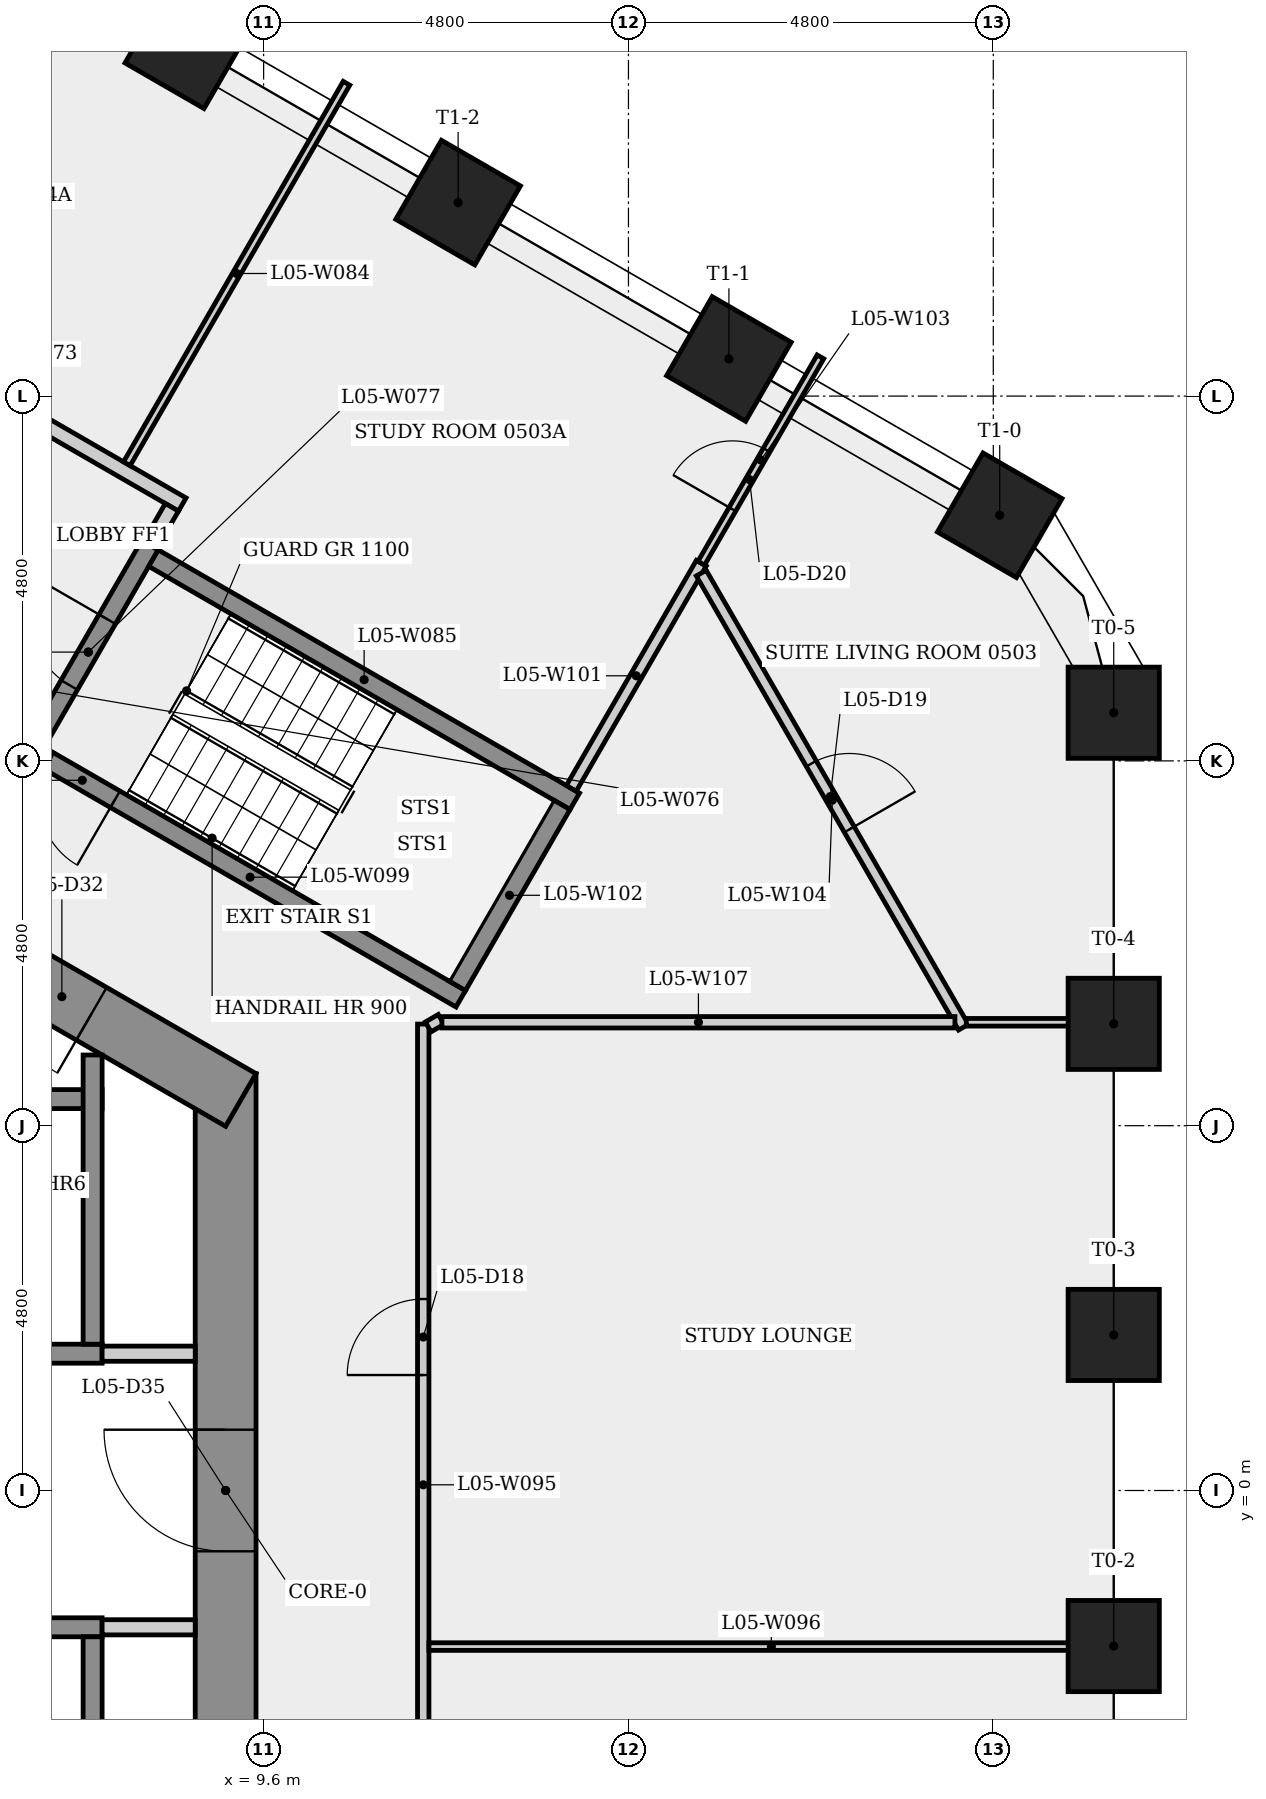
"""IFC4 building model, lengths in metres.
Left out: names, types, materials, properties, quantities, classifications, styles, units other than length and angle.
Written with IfcOpenShell. Run it as: python <this file> out.ifc"""

import sys

from ifc_helpers import new_model, si_unit, direction, frame, frame_2d, origin, origin_2d, place, context, subcontext, project, spatial, rectangle, extrude, element, fill, save


model = new_model("IFC4")
c1 = context("Model", 3, precision=1e-05, world=origin(), true_north=direction((0.0, 1.0)))
c2 = subcontext(c1, "Body", "Model", "MODEL_VIEW")
j1 = project(units=[si_unit("LENGTHUNIT", "METRE"), si_unit("PLANEANGLEUNIT", "RADIAN")], contexts=[c1])
p1 = place(None, origin())
s1 = spatial("IfcSite", under=j1, at=p1, CompositionType="ELEMENT")
p2 = place(p1, origin())
s2 = spatial("IfcBuilding", under=s1, at=p2, CompositionType="ELEMENT")
p3 = place(p2, frame((0.0, 0.0, 25.5)))
s3 = spatial("IfcBuildingStorey", under=s2, at=p3, CompositionType="ELEMENT", Elevation=25.5)
p4 = place(p3, frame((9.1, -5.485, 0.0), z_axis=(0.0, 0.0, 1.0), x_axis=(0.0, 1.0, 0.0)))
e1 = element("IfcWall", 1, at=p4, inside=s3, PredefinedType="SHEAR", context=c2, shape_type="SweptSolid", body=[
    extrude(rectangle(XDim=10.97, YDim=0.8, at=frame_2d((5.485, 0.0))), origin(), (0.0, 0.0, 1.0), 3.4),
])
p5 = place(p4, frame((4.685, 0.0, 0.0)))
e2 = element("IfcOpeningElement", 2, at=p5, cuts=e1, PredefinedType="OPENING", context=c2, shape_type="SweptSolid", body=[
    extrude(rectangle(XDim=1.6, YDim=2.1, at=frame_2d((0.8, 1.05))), frame((0.0, 0.41, 0.0), z_axis=(0.0, -1.0, 0.0), x_axis=(1.0, 0.0, 0.0)), (0.0, 0.0, 1.0), 0.82),
])
p6 = place(p3, frame((9.3, 5.138, 0.0), z_axis=(0.0, 0.0, 1.0), x_axis=(-0.866023993627, 0.500002442456, 0.0)))
e3 = element("IfcWall", 3, at=p6, inside=s3, PredefinedType="SHEAR", context=c2, shape_type="SweptSolid", body=[
    extrude(rectangle(XDim=10.97, YDim=0.8, at=frame_2d((5.485, 0.0))), origin(), (0.0, 0.0, 1.0), 3.4),
])
p7 = place(p6, frame((8.903, 0.0, 0.0)))
e4 = element("IfcOpeningElement", 4, at=p7, cuts=e3, PredefinedType="OPENING", context=c2, shape_type="SweptSolid", body=[
    extrude(rectangle(XDim=0.9, YDim=2.1, at=frame_2d((0.45, 1.05))), frame((0.0, 0.41, 0.0), z_axis=(0.0, -1.0, 0.0), x_axis=(1.0, 0.0, 0.0)), (0.0, 0.0, 1.0), 0.82),
])
p8 = place(p6, frame((2.269, 0.0, 0.0)))
e5 = element("IfcOpeningElement", 5, at=p8, cuts=e3, PredefinedType="OPENING", context=c2, shape_type="SweptSolid", body=[
    extrude(rectangle(XDim=0.9, YDim=2.1, at=frame_2d((0.45, 1.05))), frame((0.0, 0.41, 0.0), z_axis=(0.0, -1.0, 0.0), x_axis=(1.0, 0.0, 0.0)), (0.0, 0.0, 1.0), 0.82),
])
for number, where, z_axis, x_axis in (
    (6, (20.785, -2.047, 0.0), (0.0, 0.0, 1.0), (1.0, 0.0, 0.0)),
    (7, (20.785, 2.047, 0.0), (0.0, 0.0, 1.0), (1.0, 0.0, 0.0)),
    (8, (20.785, 6.14, 0.0), (0.0, 0.0, 1.0), (1.0, 0.0, 0.0)),
    (9, (20.785, 10.234, 0.0), (0.0, 0.0, 1.0), (1.0, 0.0, 0.0)),
    (10, (19.285, 12.832, 0.0), (0.0, 0.0, 1.0), (0.5, 0.866, 0.0)),
    (11, (15.722, 14.889, 0.0), (0.0, 0.0, 1.0), (0.5, 0.866, 0.0)),
    (12, (12.159, 16.946, 0.0), (0.0, 0.0, 1.0), (0.5, 0.866, 0.0)),
    (13, (8.596, 19.003, 0.0), (0.0, 0.0, 1.0), (0.5, 0.866, 0.0)),
):
    element("IfcColumn", number, at=place(p3, frame(where, z_axis=z_axis, x_axis=x_axis)), inside=s3, PredefinedType="COLUMN", context=c2, shape_type="SweptSolid", body=[
        extrude(rectangle(XDim=1.2, YDim=1.2, at=origin_2d()), origin(), (0.0, 0.0, 1.0), 3.4),
    ])
p9 = place(p3, frame((-7.475, 1.8, 0.0), z_axis=(0.0, 0.0, 1.0), x_axis=(1.0, 0.0, 0.0)))
e14 = element("IfcWall", 14, at=p9, inside=s3, PredefinedType="SHEAR", context=c2, shape_type="SweptSolid", body=[
    extrude(rectangle(XDim=14.95, YDim=0.25, at=frame_2d((7.475, 0.0))), origin(), (0.0, 0.0, 1.0), 3.05),
])
p10 = place(p3, frame((-7.225, 5.15, 0.0), z_axis=(0.0, 0.0, 1.0), x_axis=(1.0, 0.0, 0.0)))
e15 = element("IfcWall", 15, at=p10, inside=s3, PredefinedType="SHEAR", context=c2, shape_type="SweptSolid", body=[
    extrude(rectangle(XDim=14.7, YDim=0.25, at=frame_2d((7.35, 0.0))), origin(), (0.0, 0.0, 1.0), 3.05),
])
p11 = place(p3, frame((-7.225, -1.8, 0.0), z_axis=(0.0, 0.0, 1.0), x_axis=(1.0, 0.0, 0.0)))
e16 = element("IfcWall", 16, at=p11, inside=s3, PredefinedType="SHEAR", context=c2, shape_type="SweptSolid", body=[
    extrude(rectangle(XDim=14.7, YDim=0.25, at=frame_2d((7.35, 0.0))), origin(), (0.0, 0.0, 1.0), 3.05),
])
p12 = place(p11, frame((0.597, 0.0, 0.0)))
e17 = element("IfcOpeningElement", 17, at=p12, cuts=e16, PredefinedType="OPENING", context=c2, shape_type="SweptSolid", body=[
    extrude(rectangle(XDim=1.1, YDim=2.1, at=frame_2d((0.55, 1.05))), frame((0.0, 0.135, 0.0), z_axis=(0.0, -1.0, 0.0), x_axis=(1.0, 0.0, 0.0)), (0.0, 0.0, 1.0), 0.27),
])
p13 = place(p11, frame((3.0, 0.0, 0.0)))
e18 = element("IfcOpeningElement", 18, at=p13, cuts=e16, PredefinedType="OPENING", context=c2, shape_type="SweptSolid", body=[
    extrude(rectangle(XDim=1.1, YDim=2.1, at=frame_2d((0.55, 1.05))), frame((0.0, 0.135, 0.0), z_axis=(0.0, -1.0, 0.0), x_axis=(1.0, 0.0, 0.0)), (0.0, 0.0, 1.0), 0.27),
])
p14 = place(p11, frame((5.45, 0.0, 0.0)))
e19 = element("IfcOpeningElement", 19, at=p14, cuts=e16, PredefinedType="OPENING", context=c2, shape_type="SweptSolid", body=[
    extrude(rectangle(XDim=1.1, YDim=2.1, at=frame_2d((0.55, 1.05))), frame((0.0, 0.135, 0.0), z_axis=(0.0, -1.0, 0.0), x_axis=(1.0, 0.0, 0.0)), (0.0, 0.0, 1.0), 0.27),
])
p15 = place(p11, frame((7.9, 0.0, 0.0)))
e20 = element("IfcOpeningElement", 20, at=p15, cuts=e16, PredefinedType="OPENING", context=c2, shape_type="SweptSolid", body=[
    extrude(rectangle(XDim=1.1, YDim=2.1, at=frame_2d((0.55, 1.05))), frame((0.0, 0.135, 0.0), z_axis=(0.0, -1.0, 0.0), x_axis=(1.0, 0.0, 0.0)), (0.0, 0.0, 1.0), 0.27),
])
p16 = place(p11, frame((10.35, 0.0, 0.0)))
e21 = element("IfcOpeningElement", 21, at=p16, cuts=e16, PredefinedType="OPENING", context=c2, shape_type="SweptSolid", body=[
    extrude(rectangle(XDim=1.1, YDim=2.1, at=frame_2d((0.55, 1.05))), frame((0.0, 0.135, 0.0), z_axis=(0.0, -1.0, 0.0), x_axis=(1.0, 0.0, 0.0)), (0.0, 0.0, 1.0), 0.27),
])
p17 = place(p3, frame((4.459, 15.323, 0.0), z_axis=(0.0, 0.0, 1.0), x_axis=(0.866016039709, -0.500016218704, 0.0)))
e22 = element("IfcWall", 22, at=p17, inside=s3, PredefinedType="PARTITIONING", context=c2, shape_type="SweptSolid", body=[
    extrude(rectangle(XDim=4.7, YDim=0.2, at=frame_2d((2.35, 0.0))), origin(), (0.0, 0.0, 1.0), 3.05),
])
p18 = place(p3, frame((6.48, 9.624, 0.0), z_axis=(0.0, 0.0, 1.0), x_axis=(0.500017246033, 0.866015446554, 0.0)))
e23 = element("IfcWall", 23, at=p18, inside=s3, PredefinedType="SHEAR", context=c2, shape_type="SweptSolid", body=[
    extrude(rectangle(XDim=3.25, YDim=0.25, at=frame_2d((1.625, 0.0))), origin(), (0.0, 0.0, 1.0), 3.05),
])
p19 = place(p18, frame((1.125, 0.0, 0.0)))
e24 = element("IfcOpeningElement", 24, at=p19, cuts=e23, PredefinedType="OPENING", context=c2, shape_type="SweptSolid", body=[
    extrude(rectangle(XDim=1.0, YDim=2.1, at=frame_2d((0.5, 1.05))), frame((0.0, 0.135, 0.0), z_axis=(0.0, -1.0, 0.0), x_axis=(1.0, 0.0, 0.0)), (0.0, 0.0, 1.0), 0.27),
])
p20 = place(p3, frame((7.475, 1.8, 0.0), z_axis=(0.0, 0.0, 1.0), x_axis=(1.0, 0.0, 0.0)))
e25 = element("IfcWall", 25, at=p20, inside=s3, PredefinedType="PARTITIONING", context=c2, shape_type="SweptSolid", body=[
    extrude(rectangle(XDim=1.225, YDim=0.2, at=frame_2d((0.613, 0.0))), origin(), (0.0, 0.0, 1.0), 3.05),
])
for number, where, z_axis, x_axis in (
    (26, (7.35, -1.925, 0.0), (0.0, 0.0, 1.0), (0.0, -1.0, 0.0)),
    (27, (7.35, 5.73, 0.0), (0.0, 0.0, 1.0), (0.0, -1.0, 0.0)),
):
    element("IfcWall", number, at=place(p3, frame(where, z_axis=z_axis, x_axis=x_axis)), inside=s3, PredefinedType="SHEAR", context=c2, shape_type="SweptSolid", body=[
        extrude(rectangle(XDim=3.805, YDim=0.25, at=frame_2d((1.903, 0.0))), origin(), (0.0, 0.0, 1.0), 3.05),
    ])
p21 = place(p3, frame((7.8, 13.51, 0.0), z_axis=(0.0, 0.0, 1.0), x_axis=(0.499982030767, 0.866035778077, 0.0)))
e28 = element("IfcWall", 28, at=p21, inside=s3, PredefinedType="PARTITIONING", context=c2, shape_type="SweptSolid", body=[
    extrude(rectangle(XDim=5.781, YDim=0.1, at=frame_2d((2.89, 0.0))), origin(), (0.0, 0.0, 1.0), 3.05),
])
p22 = place(p3, frame((8.151, 12.268, 0.0), z_axis=(0.0, 0.0, 1.0), x_axis=(0.866025499775, -0.499999833739, 0.0)))
e29 = element("IfcWall", 29, at=p22, inside=s3, PredefinedType="SHEAR", context=c2, shape_type="SweptSolid", body=[
    extrude(rectangle(XDim=6.4, YDim=0.25, at=frame_2d((3.2, 0.0))), origin(), (0.0, 0.0, 1.0), 3.05),
])
p23 = place(p3, frame((8.393, 12.937, 0.0), z_axis=(0.0, 0.0, 1.0), x_axis=(-0.500065409566, -0.86598763626, 0.0)))
e30 = element("IfcWall", 30, at=p23, inside=s3, PredefinedType="PARTITIONING", context=c2, shape_type="SweptSolid", body=[
    extrude(rectangle(XDim=0.575, YDim=0.2, at=frame_2d((0.288, 0.0))), origin(), (0.0, 0.0, 1.0), 3.05),
])
p24 = place(p3, frame((8.7, -1.8, 0.0), z_axis=(0.0, 0.0, 1.0), x_axis=(-1.0, 0.0, 0.0)))
e31 = element("IfcWall", 31, at=p24, inside=s3, PredefinedType="PARTITIONING", context=c2, shape_type="SweptSolid", body=[
    extrude(rectangle(XDim=1.225, YDim=0.2, at=frame_2d((0.613, 0.0))), origin(), (0.0, 0.0, 1.0), 3.05),
])
p25 = place(p3, frame((11.7, -5.987, 0.0), z_axis=(0.0, 0.0, 1.0), x_axis=(0.0, 1.0, 0.0)))
e32 = element("IfcWall", 32, at=p25, inside=s3, PredefinedType="PARTITIONING", context=c2, shape_type="SweptSolid", body=[
    extrude(rectangle(XDim=12.125, YDim=0.15, at=frame_2d((6.062, 0.0))), origin(), (0.0, 0.0, 1.0), 3.05),
])
p26 = place(p25, frame((7.507, 0.0, 0.0)))
e33 = element("IfcOpeningElement", 33, at=p26, cuts=e32, PredefinedType="OPENING", context=c2, shape_type="SweptSolid", body=[
    extrude(rectangle(XDim=1.0, YDim=2.1, at=frame_2d((0.5, 1.05))), frame((0.0, 0.085, 0.0), z_axis=(0.0, -1.0, 0.0), x_axis=(1.0, 0.0, 0.0)), (0.0, 0.0, 1.0), 0.17),
])
p27 = place(p3, frame((11.775, -2.054, 0.0), z_axis=(0.0, 0.0, 1.0), x_axis=(1.0, 0.0, 0.0)))
e34 = element("IfcWall", 34, at=p27, inside=s3, PredefinedType="PARTITIONING", context=c2, shape_type="SweptSolid", body=[
    extrude(rectangle(XDim=9.01, YDim=0.1, at=frame_2d((4.505, 0.0))), origin(), (0.0, 0.0, 1.0), 3.05),
])
p28 = place(p3, frame((11.936, 6.198, 0.0), z_axis=(0.0, 0.0, 1.0), x_axis=(-0.866103179807, -0.499865263774, 0.0)))
e35 = element("IfcWall", 35, at=p28, inside=s3, PredefinedType="PARTITIONING", context=c2, shape_type="SweptSolid", body=[
    extrude(rectangle(XDim=0.197, YDim=0.15, at=frame_2d((0.099, 0.0))), origin(), (0.0, 0.0, 1.0), 3.05),
])
p29 = place(p3, frame((12.194, 6.47, 0.0), z_axis=(0.0, 0.0, 1.0), x_axis=(-0.866025499775, 0.499999833739, 0.0)))
e36 = element("IfcWall", 36, at=p29, inside=s3, PredefinedType="SHEAR", context=c2, shape_type="SweptSolid", body=[
    extrude(rectangle(XDim=6.4, YDim=0.25, at=frame_2d((3.2, 0.0))), origin(), (0.0, 0.0, 1.0), 3.05),
])
p30 = place(p29, frame((5.25, 0.0, 0.0)))
e37 = element("IfcOpeningElement", 37, at=p30, cuts=e36, PredefinedType="OPENING", context=c2, shape_type="SweptSolid", body=[
    extrude(rectangle(XDim=1.0, YDim=2.1, at=frame_2d((0.5, 1.05))), frame((0.0, 0.135, 0.0), z_axis=(0.0, -1.0, 0.0), x_axis=(1.0, 0.0, 0.0)), (0.0, 0.0, 1.0), 0.27),
])
p31 = place(p3, frame((13.648, 9.239, 0.0), z_axis=(0.0, 0.0, 1.0), x_axis=(0.500000491645, 0.866025119933, 0.0)))
e38 = element("IfcWall", 38, at=p31, inside=s3, PredefinedType="PARTITIONING", context=c2, shape_type="SweptSolid", body=[
    extrude(rectangle(XDim=3.42, YDim=0.15, at=frame_2d((1.71, 0.0))), origin(), (0.0, 0.0, 1.0), 3.05),
])
p32 = place(p3, frame((13.523, 9.022, 0.0), z_axis=(0.0, 0.0, 1.0), x_axis=(-0.500034990121, -0.866005201286, 0.0)))
e39 = element("IfcWall", 39, at=p32, inside=s3, PredefinedType="SHEAR", context=c2, shape_type="SweptSolid", body=[
    extrude(rectangle(XDim=2.75, YDim=0.25, at=frame_2d((1.375, 0.0))), origin(), (0.0, 0.0, 1.0), 3.05),
])
p33 = place(p3, frame((15.358, 12.201, 0.0), z_axis=(0.0, 0.0, 1.0), x_axis=(0.500041479787, 0.866001454094, 0.0)))
e40 = element("IfcWall", 40, at=p33, inside=s3, PredefinedType="PARTITIONING", context=c2, shape_type="SweptSolid", body=[
    extrude(rectangle(XDim=3.135, YDim=0.1, at=frame_2d((1.568, 0.0))), origin(), (0.0, 0.0, 1.0), 3.05),
])
p34 = place(p33, frame((0.82, 0.0, 0.0)))
e41 = element("IfcOpeningElement", 41, at=p34, cuts=e40, PredefinedType="OPENING", context=c2, shape_type="SweptSolid", body=[
    extrude(rectangle(XDim=0.9, YDim=2.1, at=frame_2d((0.45, 1.05))), frame((0.0, 0.06, 0.0), z_axis=(0.0, -1.0, 0.0), x_axis=(1.0, 0.0, 0.0)), (0.0, 0.0, 1.0), 0.12),
])
p35 = place(p3, frame((15.358, 12.071, 0.0), z_axis=(0.0, 0.0, 1.0), x_axis=(0.500024667842, -0.866011161331, 0.0)))
e42 = element("IfcWall", 42, at=p35, inside=s3, PredefinedType="PARTITIONING", context=c2, shape_type="SweptSolid", body=[
    extrude(rectangle(XDim=6.9, YDim=0.15, at=frame_2d((3.45, 0.0))), origin(), (0.0, 0.0, 1.0), 3.05),
])
p36 = place(p35, frame((2.895, 0.0, 0.0)))
e43 = element("IfcOpeningElement", 43, at=p36, cuts=e42, PredefinedType="OPENING", context=c2, shape_type="SweptSolid", body=[
    extrude(rectangle(XDim=1.0, YDim=2.1, at=frame_2d((0.5, 1.05))), frame((0.0, 0.085, 0.0), z_axis=(0.0, -1.0, 0.0), x_axis=(1.0, 0.0, 0.0)), (0.0, 0.0, 1.0), 0.17),
])
p37 = place(p3, frame((18.845, 6.161, 0.0), z_axis=(0.0, 0.0, 1.0), x_axis=(1.0, 0.0, 0.0)))
e44 = element("IfcWall", 44, at=p37, inside=s3, PredefinedType="PARTITIONING", context=c2, shape_type="SweptSolid", body=[
    extrude(rectangle(XDim=1.939, YDim=0.1, at=frame_2d((0.97, 0.0))), origin(), (0.0, 0.0, 1.0), 3.05),
])
p38 = place(p3, frame((18.695, 6.161, 0.0), z_axis=(0.0, 0.0, 1.0), x_axis=(-1.0, 0.0, 0.0)))
e45 = element("IfcWall", 45, at=p38, inside=s3, PredefinedType="PARTITIONING", context=c2, shape_type="SweptSolid", body=[
    extrude(rectangle(XDim=6.75, YDim=0.15, at=frame_2d((3.375, 0.0))), origin(), (0.0, 0.0, 1.0), 3.05),
])
p39 = place(p30, origin())
e46 = element("IfcDoor", 46, at=p39, inside=s3, OperationType="SINGLE_SWING_LEFT", PredefinedType="DOOR", context=c2, shape_type="SweptSolid", body=[
    extrude(rectangle(XDim=1.0, YDim=2.1, at=frame_2d((0.5, 1.05))), frame((0.0, 0.025, 0.0), z_axis=(0.0, -1.0, 0.0), x_axis=(1.0, 0.0, 0.0)), (0.0, 0.0, 1.0), 0.05),
])
fill(e37, e46)
p40 = place(p19, origin())
e47 = element("IfcDoor", 47, at=p40, inside=s3, OperationType="SINGLE_SWING_RIGHT", PredefinedType="DOOR", context=c2, shape_type="SweptSolid", body=[
    extrude(rectangle(XDim=1.0, YDim=2.1, at=frame_2d((0.5, 1.05))), frame((0.0, 0.025, 0.0), z_axis=(0.0, -1.0, 0.0), x_axis=(1.0, 0.0, 0.0)), (0.0, 0.0, 1.0), 0.05),
])
fill(e24, e47)
p41 = place(p26, origin())
e48 = element("IfcDoor", 48, at=p41, inside=s3, OperationType="SINGLE_SWING_LEFT", PredefinedType="DOOR", context=c2, shape_type="SweptSolid", body=[
    extrude(rectangle(XDim=1.0, YDim=2.1, at=frame_2d((0.5, 1.05))), frame((0.0, 0.025, 0.0), z_axis=(0.0, -1.0, 0.0), x_axis=(1.0, 0.0, 0.0)), (0.0, 0.0, 1.0), 0.05),
])
fill(e33, e48)
p42 = place(p36, origin())
e49 = element("IfcDoor", 49, at=p42, inside=s3, OperationType="SINGLE_SWING_RIGHT", PredefinedType="DOOR", context=c2, shape_type="SweptSolid", body=[
    extrude(rectangle(XDim=1.0, YDim=2.1, at=frame_2d((0.5, 1.05))), frame((0.0, 0.025, 0.0), z_axis=(0.0, -1.0, 0.0), x_axis=(1.0, 0.0, 0.0)), (0.0, 0.0, 1.0), 0.05),
])
fill(e43, e49)
p43 = place(p34, origin())
e50 = element("IfcDoor", 50, at=p43, inside=s3, OperationType="SINGLE_SWING_LEFT", PredefinedType="DOOR", context=c2, shape_type="SweptSolid", body=[
    extrude(rectangle(XDim=0.9, YDim=2.1, at=frame_2d((0.45, 1.05))), frame((0.0, 0.025, 0.0), z_axis=(0.0, -1.0, 0.0), x_axis=(1.0, 0.0, 0.0)), (0.0, 0.0, 1.0), 0.05),
])
fill(e41, e50)
p44 = place(p8, origin())
e51 = element("IfcDoor", 51, at=p44, inside=s3, OperationType="SINGLE_SWING_LEFT", PredefinedType="DOOR", context=c2, shape_type="SweptSolid", body=[
    extrude(rectangle(XDim=0.9, YDim=2.1, at=frame_2d((0.45, 1.05))), frame((0.0, 0.025, 0.0), z_axis=(0.0, -1.0, 0.0), x_axis=(1.0, 0.0, 0.0)), (0.0, 0.0, 1.0), 0.05),
])
fill(e5, e51)
p45 = place(p5, origin())
e52 = element("IfcDoor", 52, at=p45, inside=s3, OperationType="SINGLE_SWING_RIGHT", PredefinedType="DOOR", context=c2, shape_type="SweptSolid", body=[
    extrude(rectangle(XDim=1.6, YDim=2.1, at=frame_2d((0.8, 1.05))), frame((0.0, 0.025, 0.0), z_axis=(0.0, -1.0, 0.0), x_axis=(1.0, 0.0, 0.0)), (0.0, 0.0, 1.0), 0.05),
])
fill(e2, e52)
save(model, sys.argv[1])
